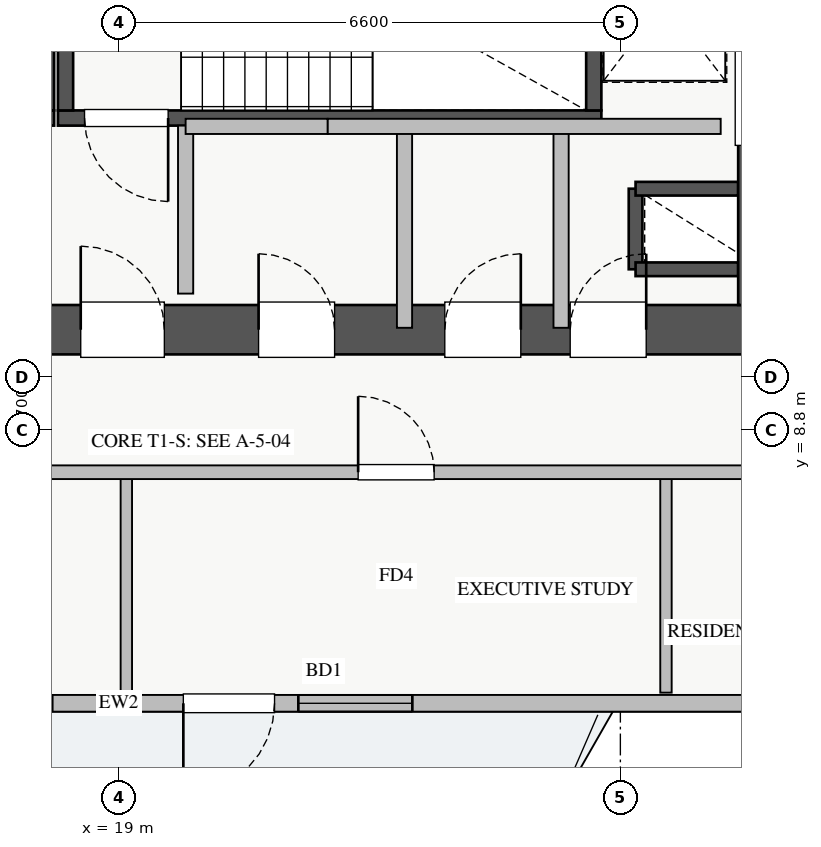
"""IFC4 building model, lengths in metres.
Left out: names, types, materials, properties, quantities, classifications, styles, units other than length and angle.
Written with IfcOpenShell. Run it as: python <this file> out.ifc"""

import sys

from ifc_helpers import new_model, si_unit, direction, frame, frame_2d, origin, place, context, subcontext, project, spatial, rectangle, extrude, source, transform, mapped, element, fill, save


model = new_model("IFC4")
c1 = context("Model", 3, precision=1e-05, world=origin(), true_north=direction((0.0, 1.0)))
c2 = subcontext(c1, "Body", "Model", "MODEL_VIEW")
j1 = project(units=[si_unit("LENGTHUNIT", "METRE"), si_unit("PLANEANGLEUNIT", "RADIAN")], contexts=[c1])
p1 = place(None, origin())
s1 = spatial("IfcSite", under=j1, at=p1, CompositionType="ELEMENT")
p2 = place(p1, origin())
s2 = spatial("IfcBuilding", under=s1, at=p2, CompositionType="ELEMENT")
p3 = place(p2, frame((0.0, 0.0, 119.75)))
s3 = spatial("IfcBuildingStorey", under=s2, at=p3, CompositionType="ELEMENT", Elevation=119.75)
p4 = place(p3, frame((25.8, 10.92, 0.0), z_axis=(0.0, 0.0, 1.0), x_axis=(0.0, 1.0, 0.0)))
e1 = element("IfcWall", 1, at=p4, inside=s3, PredefinedType="SHEAR", context=c2, shape_type="SweptSolid", body=[
    extrude(rectangle(XDim=1.06, YDim=0.18, at=frame_2d((0.53, 0.0))), origin(), (0.0, 0.0, 1.0), 3.07),
])
for number, where, z_axis, x_axis in (
    (2, (25.8, 11.98, 0.0), (0.0, 0.0, 1.0), (1.0, 0.0, 0.0)),
    (3, (25.8, 10.92, 0.0), (0.0, 0.0, 1.0), (1.0, 0.0, 0.0)),
):
    element("IfcWall", number, at=place(p3, frame(where, z_axis=z_axis, x_axis=x_axis)), inside=s3, PredefinedType="SHEAR", context=c2, shape_type="SweptSolid", body=[
        extrude(rectangle(XDim=1.35, YDim=0.18, at=frame_2d((0.675, 0.0))), origin(), (0.0, 0.0, 1.0), 3.07),
    ])
p5 = place(p3, frame((10.85, 12.91, 0.0), z_axis=(0.0, 0.0, 1.0), x_axis=(1.0, 0.0, 0.0)))
e4 = element("IfcWall", 4, at=p5, inside=s3, PredefinedType="SHEAR", context=c2, shape_type="SweptSolid", body=[
    extrude(rectangle(XDim=7.3, YDim=0.2, at=frame_2d((3.65, 0.0))), origin(), (0.0, 0.0, 1.0), 3.25),
])
p6 = place(p5, frame((0.35, 0.0, 0.0)))
e5 = element("IfcOpeningElement", 5, at=p6, cuts=e4, PredefinedType="OPENING", context=c2, shape_type="SweptSolid", body=[
    extrude(rectangle(XDim=1.1, YDim=2.05, at=frame_2d((0.55, 1.025))), frame((0.0, 0.11, 0.0), z_axis=(0.0, -1.0, 0.0), x_axis=(1.0, 0.0, 0.0)), (0.0, 0.0, 1.0), 0.22),
])
p7 = place(p3, frame((18.05, 13.01, 0.0), z_axis=(0.0, 0.0, 1.0), x_axis=(0.0, 1.0, 0.0)))
e6 = element("IfcWall", 6, at=p7, inside=s3, PredefinedType="SHEAR", context=c2, shape_type="SweptSolid", body=[
    extrude(rectangle(XDim=2.94, YDim=0.2, at=frame_2d((1.47, 0.0))), origin(), (0.0, 0.0, 1.0), 3.25),
])
p8 = place(p3, frame((18.2, 12.91, 0.0), z_axis=(0.0, 0.0, 1.0), x_axis=(1.0, 0.0, 0.0)))
e7 = element("IfcWall", 7, at=p8, inside=s3, PredefinedType="SHEAR", context=c2, shape_type="SweptSolid", body=[
    extrude(rectangle(XDim=7.15, YDim=0.2, at=frame_2d((3.575, 0.0))), origin(), (0.0, 0.0, 1.0), 3.25),
])
p9 = place(p8, frame((0.35, 0.0, 0.0)))
e8 = element("IfcOpeningElement", 8, at=p9, cuts=e7, PredefinedType="OPENING", context=c2, shape_type="SweptSolid", body=[
    extrude(rectangle(XDim=1.1, YDim=2.05, at=frame_2d((0.55, 1.025))), frame((0.0, 0.11, 0.0), z_axis=(0.0, -1.0, 0.0), x_axis=(1.0, 0.0, 0.0)), (0.0, 0.0, 1.0), 0.22),
])
for number, where, z_axis, x_axis in (
    (9, (18.3, 13.01, 0.0), (0.0, 0.0, 1.0), (0.0, 1.0, 0.0)),
    (10, (25.25, 13.01, 0.0), (0.0, 0.0, 1.0), (0.0, 1.0, 0.0)),
):
    element("IfcWall", number, at=place(p3, frame(where, z_axis=z_axis, x_axis=x_axis)), inside=s3, PredefinedType="SHEAR", context=c2, shape_type="SweptSolid", body=[
        extrude(rectangle(XDim=2.94, YDim=0.2, at=frame_2d((1.47, 0.0))), origin(), (0.0, 0.0, 1.0), 3.25),
    ])
p10 = place(p3, frame((10.2, 10.125, 0.0), z_axis=(0.0, 0.0, 1.0), x_axis=(1.0, 0.0, 0.0)))
e11 = element("IfcWall", 11, at=p10, inside=s3, PredefinedType="SHEAR", context=c2, shape_type="SweptSolid", body=[
    extrude(rectangle(XDim=17.6, YDim=0.65, at=frame_2d((8.8, 0.0))), origin(), (0.0, 0.0, 1.0), 3.25),
])
p11 = place(p10, frame((1.15, 0.0, 0.0)))
e12 = element("IfcOpeningElement", 12, at=p11, cuts=e11, PredefinedType="OPENING", context=c2, shape_type="SweptSolid", body=[
    extrude(rectangle(XDim=1.1, YDim=2.05, at=frame_2d((0.55, 1.025))), frame((0.0, 0.335, 0.0), z_axis=(0.0, -1.0, 0.0), x_axis=(1.0, 0.0, 0.0)), (0.0, 0.0, 1.0), 0.67),
])
p12 = place(p10, frame((8.3, 0.0, 0.0)))
e13 = element("IfcOpeningElement", 13, at=p12, cuts=e11, PredefinedType="OPENING", context=c2, shape_type="SweptSolid", body=[
    extrude(rectangle(XDim=1.1, YDim=2.05, at=frame_2d((0.55, 1.025))), frame((0.0, 0.335, 0.0), z_axis=(0.0, -1.0, 0.0), x_axis=(1.0, 0.0, 0.0)), (0.0, 0.0, 1.0), 0.67),
])
p13 = place(p10, frame((4.9, 0.0, 0.0)))
e14 = element("IfcOpeningElement", 14, at=p13, cuts=e11, PredefinedType="OPENING", context=c2, shape_type="SweptSolid", body=[
    extrude(rectangle(XDim=1.1, YDim=2.05, at=frame_2d((0.55, 1.025))), frame((0.0, 0.335, 0.0), z_axis=(0.0, -1.0, 0.0), x_axis=(1.0, 0.0, 0.0)), (0.0, 0.0, 1.0), 0.67),
])
p14 = place(p10, frame((14.74, 0.0, 0.0)))
e15 = element("IfcOpeningElement", 15, at=p14, cuts=e11, PredefinedType="OPENING", context=c2, shape_type="SweptSolid", body=[
    extrude(rectangle(XDim=1.0, YDim=2.05, at=frame_2d((0.5, 1.025))), frame((0.0, 0.335, 0.0), z_axis=(0.0, -1.0, 0.0), x_axis=(1.0, 0.0, 0.0)), (0.0, 0.0, 1.0), 0.67),
])
p15 = place(p10, frame((10.64, 0.0, 0.0)))
e16 = element("IfcOpeningElement", 16, at=p15, cuts=e11, PredefinedType="OPENING", context=c2, shape_type="SweptSolid", body=[
    extrude(rectangle(XDim=1.0, YDim=2.05, at=frame_2d((0.5, 1.025))), frame((0.0, 0.335, 0.0), z_axis=(0.0, -1.0, 0.0), x_axis=(1.0, 0.0, 0.0)), (0.0, 0.0, 1.0), 0.67),
])
p16 = place(p10, frame((13.09, 0.0, 0.0)))
e17 = element("IfcOpeningElement", 17, at=p16, cuts=e11, PredefinedType="OPENING", context=c2, shape_type="SweptSolid", body=[
    extrude(rectangle(XDim=1.0, YDim=2.05, at=frame_2d((0.5, 1.025))), frame((0.0, 0.335, 0.0), z_axis=(0.0, -1.0, 0.0), x_axis=(1.0, 0.0, 0.0)), (0.0, 0.0, 1.0), 0.67),
])
p17 = place(p3, frame((27.475, 10.45, 0.0), z_axis=(0.0, 0.0, 1.0), x_axis=(0.0, 1.0, 0.0)))
e18 = element("IfcWall", 18, at=p17, inside=s3, PredefinedType="SHEAR", context=c2, shape_type="SweptSolid", body=[
    extrude(rectangle(XDim=5.9, YDim=0.65, at=frame_2d((2.95, 0.0))), origin(), (0.0, 0.0, 1.0), 3.25),
])
p18 = place(p17, frame((2.1, 0.0, 0.0)))
e19 = element("IfcOpeningElement", 19, at=p18, cuts=e18, PredefinedType="OPENING", context=c2, shape_type="SweptSolid", body=[
    extrude(rectangle(XDim=1.3, YDim=2.05, at=frame_2d((0.65, 1.025))), frame((0.0, 0.335, 0.0), z_axis=(0.0, -1.0, 0.0), x_axis=(1.0, 0.0, 0.0)), (0.0, 0.0, 1.0), 0.67),
])
p19 = place(p3, frame((6.55, 5.21, 0.0), z_axis=(0.0, 0.0, 1.0), x_axis=(1.0, 0.0, 0.0)))
e20 = element("IfcWall", 20, at=p19, inside=s3, PredefinedType="STANDARD", context=c2, shape_type="SweptSolid", body=[
    extrude(rectangle(XDim=24.9, YDim=0.22, at=frame_2d((12.45, 0.0))), origin(), (0.0, 0.0, 1.0), 2.61),
])
p20 = place(p19, frame((13.3, 0.0, 0.0)))
e21 = element("IfcOpeningElement", 21, at=p20, cuts=e20, PredefinedType="OPENING", context=c2, shape_type="SweptSolid", body=[
    extrude(rectangle(XDim=1.2, YDim=2.1, at=frame_2d((0.6, 1.05))), frame((0.0, 0.12, 0.0), z_axis=(0.0, -1.0, 0.0), x_axis=(1.0, 0.0, 0.0)), (0.0, 0.0, 1.0), 0.24),
])
p21 = place(p19, frame((0.258, 0.0, 0.9)))
e22 = element("IfcOpeningElement", 22, at=p21, cuts=e20, PredefinedType="OPENING", context=c2, shape_type="SweptSolid", body=[
    extrude(rectangle(XDim=1.8, YDim=1.5, at=frame_2d((0.9, 0.75))), frame((0.0, 0.12, 0.0), z_axis=(0.0, -1.0, 0.0), x_axis=(1.0, 0.0, 0.0)), (0.0, 0.0, 1.0), 0.24),
])
p22 = place(p19, frame((9.775, 0.0, 0.9)))
e23 = element("IfcOpeningElement", 23, at=p22, cuts=e20, PredefinedType="OPENING", context=c2, shape_type="SweptSolid", body=[
    extrude(rectangle(XDim=1.8, YDim=1.5, at=frame_2d((0.9, 0.75))), frame((0.0, 0.12, 0.0), z_axis=(0.0, -1.0, 0.0), x_axis=(1.0, 0.0, 0.0)), (0.0, 0.0, 1.0), 0.24),
])
p23 = place(p19, frame((14.813, 0.0, 0.9)))
e24 = element("IfcOpeningElement", 24, at=p23, cuts=e20, PredefinedType="OPENING", context=c2, shape_type="SweptSolid", body=[
    extrude(rectangle(XDim=1.5, YDim=1.45, at=frame_2d((0.75, 0.725))), frame((0.0, 0.12, 0.0), z_axis=(0.0, -1.0, 0.0), x_axis=(1.0, 0.0, 0.0)), (0.0, 0.0, 1.0), 0.24),
])
p24 = place(p19, frame((20.738, 0.0, 0.9)))
e25 = element("IfcOpeningElement", 25, at=p24, cuts=e20, PredefinedType="OPENING", context=c2, shape_type="SweptSolid", body=[
    extrude(rectangle(XDim=2.1, YDim=1.48, at=frame_2d((1.05, 0.74))), frame((0.0, 0.12, 0.0), z_axis=(0.0, -1.0, 0.0), x_axis=(1.0, 0.0, 0.0)), (0.0, 0.0, 1.0), 0.24),
])
p25 = place(p19, frame((4.187, 0.0, 0.9)))
e26 = element("IfcOpeningElement", 26, at=p25, cuts=e20, PredefinedType="OPENING", context=c2, shape_type="SweptSolid", body=[
    extrude(rectangle(XDim=2.4, YDim=1.5, at=frame_2d((1.2, 0.75))), frame((0.0, 0.12, 0.0), z_axis=(0.0, -1.0, 0.0), x_axis=(1.0, 0.0, 0.0)), (0.0, 0.0, 1.0), 0.24),
])
p26 = place(p3, frame((19.88, 10.6, 0.0), z_axis=(0.0, 0.0, 1.0), x_axis=(0.0, 1.0, 0.0)))
e27 = element("IfcWall", 27, at=p26, inside=s3, PredefinedType="PARTITIONING", context=c2, shape_type="SweptSolid", body=[
    extrude(rectangle(XDim=2.21, YDim=0.2, at=frame_2d((1.105, 0.0))), origin(), (0.0, 0.0, 1.0), 3.07),
])
p27 = place(p3, frame((24.82, 10.15, 0.0), z_axis=(0.0, 0.0, 1.0), x_axis=(0.0, 1.0, 0.0)))
e28 = element("IfcWall", 28, at=p27, inside=s3, PredefinedType="PARTITIONING", context=c2, shape_type="SweptSolid", body=[
    extrude(rectangle(XDim=2.65, YDim=0.2, at=frame_2d((1.325, 0.0))), origin(), (0.0, 0.0, 1.0), 3.07),
])
p28 = place(p3, frame((19.88, 12.8, 0.0), z_axis=(0.0, 0.0, 1.0), x_axis=(1.0, 0.0, 0.0)))
e29 = element("IfcWall", 29, at=p28, inside=s3, PredefinedType="PARTITIONING", context=c2, shape_type="SweptSolid", body=[
    extrude(rectangle(XDim=1.87, YDim=0.2, at=frame_2d((0.935, 0.0))), origin(), (0.0, 0.0, 1.0), 3.07),
])
p29 = place(p3, frame((22.76, 10.15, 0.0), z_axis=(0.0, 0.0, 1.0), x_axis=(0.0, 1.0, 0.0)))
e30 = element("IfcWall", 30, at=p29, inside=s3, PredefinedType="PARTITIONING", context=c2, shape_type="SweptSolid", body=[
    extrude(rectangle(XDim=2.65, YDim=0.2, at=frame_2d((1.325, 0.0))), origin(), (0.0, 0.0, 1.0), 3.07),
])
p30 = place(p3, frame((21.75, 12.8, 0.0), z_axis=(0.0, 0.0, 1.0), x_axis=(1.0, 0.0, 0.0)))
e31 = element("IfcWall", 31, at=p30, inside=s3, PredefinedType="PARTITIONING", context=c2, shape_type="SweptSolid", body=[
    extrude(rectangle(XDim=5.17, YDim=0.2, at=frame_2d((2.585, 0.0))), origin(), (0.0, 0.0, 1.0), 3.07),
])
p31 = place(p3, frame((19.1, 5.35, 0.0), z_axis=(0.0, 0.0, 1.0), x_axis=(0.0, 1.0, 0.0)))
e32 = element("IfcWall", 32, at=p31, inside=s3, PredefinedType="PARTITIONING", context=c2, shape_type="SweptSolid", body=[
    extrude(rectangle(XDim=2.9, YDim=0.15, at=frame_2d((1.45, 0.0))), origin(), (0.0, 0.0, 1.0), 2.821),
])
p32 = place(p3, frame((26.2, 5.35, 0.0), z_axis=(0.0, 0.0, 1.0), x_axis=(0.0, 1.0, 0.0)))
e33 = element("IfcWall", 33, at=p32, inside=s3, PredefinedType="PARTITIONING", context=c2, shape_type="SweptSolid", body=[
    extrude(rectangle(XDim=2.9, YDim=0.15, at=frame_2d((1.45, 0.0))), origin(), (0.0, 0.0, 1.0), 3.07),
])
p33 = place(p3, frame((8.85, 8.25, 0.0), z_axis=(0.0, 0.0, 1.0), x_axis=(1.0, 0.0, 0.0)))
e34 = element("IfcWall", 34, at=p33, inside=s3, PredefinedType="PARTITIONING", context=c2, shape_type="SweptSolid", body=[
    extrude(rectangle(XDim=23.57, YDim=0.18, at=frame_2d((11.785, 0.0))), origin(), (0.0, 0.0, 1.0), 3.07),
])
p34 = place(p33, frame((2.75, 0.0, 0.0)))
e35 = element("IfcOpeningElement", 35, at=p34, cuts=e34, PredefinedType="OPENING", context=c2, shape_type="SweptSolid", body=[
    extrude(rectangle(XDim=1.0, YDim=2.05, at=frame_2d((0.5, 1.025))), frame((0.0, 0.1, 0.0), z_axis=(0.0, -1.0, 0.0), x_axis=(1.0, 0.0, 0.0)), (0.0, 0.0, 1.0), 0.2),
])
p35 = place(p33, frame((7.875, 0.0, 0.0)))
e36 = element("IfcOpeningElement", 36, at=p35, cuts=e34, PredefinedType="OPENING", context=c2, shape_type="SweptSolid", body=[
    extrude(rectangle(XDim=1.0, YDim=2.05, at=frame_2d((0.5, 1.025))), frame((0.0, 0.1, 0.0), z_axis=(0.0, -1.0, 0.0), x_axis=(1.0, 0.0, 0.0)), (0.0, 0.0, 1.0), 0.2),
])
p36 = place(p33, frame((13.3, 0.0, 0.0)))
e37 = element("IfcOpeningElement", 37, at=p36, cuts=e34, PredefinedType="OPENING", context=c2, shape_type="SweptSolid", body=[
    extrude(rectangle(XDim=1.0, YDim=2.05, at=frame_2d((0.5, 1.025))), frame((0.0, 0.1, 0.0), z_axis=(0.0, -1.0, 0.0), x_axis=(1.0, 0.0, 0.0)), (0.0, 0.0, 1.0), 0.2),
])
p37 = place(p33, frame((19.74, 0.0, 0.0)))
e38 = element("IfcOpeningElement", 38, at=p37, cuts=e34, PredefinedType="OPENING", context=c2, shape_type="SweptSolid", body=[
    extrude(rectangle(XDim=1.0, YDim=2.05, at=frame_2d((0.5, 1.025))), frame((0.0, 0.1, 0.0), z_axis=(0.0, -1.0, 0.0), x_axis=(1.0, 0.0, 0.0)), (0.0, 0.0, 1.0), 0.2),
])
m1 = source(origin(), c2, "Body", "SweptSolid", [
    extrude(rectangle(XDim=1.2, YDim=2.1, at=frame_2d((0.6, 1.05))), frame((0.0, 0.025, 0.0), z_axis=(0.0, -1.0, 0.0), x_axis=(1.0, 0.0, 0.0)), (0.0, 0.0, 1.0), 0.05),
])
p38 = place(p20, frame((1.2, 0.0, 0.0), z_axis=(0.0, 0.0, 1.0), x_axis=(-1.0, 0.0, 0.0)))
e39 = element("IfcDoor", 39, at=p38, inside=s3, OperationType="SINGLE_SWING_LEFT", PredefinedType="DOOR", context=c2, shape_type="MappedRepresentation", body=[
    mapped(m1, transform((0.0, 0.0, 0.0), x_axis=(1.0, 0.0, 0.0), y_axis=(0.0, 1.0, 0.0), z_axis=(0.0, 0.0, 1.0), scale=1.0)),
])
fill(e21, e39)
m2 = source(origin(), c2, "Body", "SweptSolid", [
    extrude(rectangle(XDim=1.8, YDim=1.5, at=frame_2d((0.9, 0.75))), frame((0.0, 0.03, 0.0), z_axis=(0.0, -1.0, 0.0), x_axis=(1.0, 0.0, 0.0)), (0.0, 0.0, 1.0), 0.06),
])
p39 = place(p22, origin())
e40 = element("IfcWindow", 40, at=p39, inside=s3, PartitioningType="DOUBLE_PANEL_VERTICAL", PredefinedType="WINDOW", context=c2, shape_type="MappedRepresentation", body=[
    mapped(m2, transform((0.0, 0.0, 0.0), x_axis=(1.0, 0.0, 0.0), y_axis=(0.0, 1.0, 0.0), z_axis=(0.0, 0.0, 1.0), scale=1.0)),
])
fill(e23, e40)
m3 = source(origin(), c2, "Body", "SweptSolid", [
    extrude(rectangle(XDim=1.5, YDim=1.45, at=frame_2d((0.75, 0.725))), frame((0.0, 0.03, 0.0), z_axis=(0.0, -1.0, 0.0), x_axis=(1.0, 0.0, 0.0)), (0.0, 0.0, 1.0), 0.06),
])
p40 = place(p23, origin())
e41 = element("IfcWindow", 41, at=p40, inside=s3, PartitioningType="DOUBLE_PANEL_VERTICAL", PredefinedType="WINDOW", context=c2, shape_type="MappedRepresentation", body=[
    mapped(m3, transform((0.0, 0.0, 0.0), x_axis=(1.0, 0.0, 0.0), y_axis=(0.0, 1.0, 0.0), z_axis=(0.0, 0.0, 1.0), scale=1.0)),
])
fill(e24, e41)
m4 = source(origin(), c2, "Body", "SweptSolid", [
    extrude(rectangle(XDim=1.1, YDim=2.05, at=frame_2d((0.55, 1.025))), frame((0.0, 0.025, 0.0), z_axis=(0.0, -1.0, 0.0), x_axis=(1.0, 0.0, 0.0)), (0.0, 0.0, 1.0), 0.05),
])
p41 = place(p12, origin())
e42 = element("IfcDoor", 42, at=p41, inside=s3, OperationType="SINGLE_SWING_LEFT", PredefinedType="DOOR", context=c2, shape_type="MappedRepresentation", body=[
    mapped(m4, transform((0.0, 0.0, 0.0), x_axis=(1.0, 0.0, 0.0), y_axis=(0.0, 1.0, 0.0), z_axis=(0.0, 0.0, 1.0), scale=1.0)),
])
fill(e13, e42)
p42 = place(p9, frame((1.1, 0.0, 0.0), z_axis=(0.0, 0.0, 1.0), x_axis=(-1.0, 0.0, 0.0)))
e43 = element("IfcDoor", 43, at=p42, inside=s3, OperationType="SINGLE_SWING_RIGHT", PredefinedType="DOOR", context=c2, shape_type="MappedRepresentation", body=[
    mapped(m4, transform((0.0, 0.0, 0.0), x_axis=(1.0, 0.0, 0.0), y_axis=(0.0, 1.0, 0.0), z_axis=(0.0, 0.0, 1.0), scale=1.0)),
])
fill(e8, e43)
m5 = source(origin(), c2, "Body", "SweptSolid", [
    extrude(rectangle(XDim=1.0, YDim=2.05, at=frame_2d((0.5, 1.025))), frame((0.0, 0.025, 0.0), z_axis=(0.0, -1.0, 0.0), x_axis=(1.0, 0.0, 0.0)), (0.0, 0.0, 1.0), 0.05),
])
p43 = place(p14, origin())
e44 = element("IfcDoor", 44, at=p43, inside=s3, OperationType="SINGLE_SWING_RIGHT", PredefinedType="DOOR", context=c2, shape_type="MappedRepresentation", body=[
    mapped(m5, transform((0.0, 0.0, 0.0), x_axis=(1.0, 0.0, 0.0), y_axis=(0.0, 1.0, 0.0), z_axis=(0.0, 0.0, 1.0), scale=1.0)),
])
fill(e15, e44)
p44 = place(p15, origin())
e45 = element("IfcDoor", 45, at=p44, inside=s3, OperationType="SINGLE_SWING_LEFT", PredefinedType="DOOR", context=c2, shape_type="MappedRepresentation", body=[
    mapped(m5, transform((0.0, 0.0, 0.0), x_axis=(1.0, 0.0, 0.0), y_axis=(0.0, 1.0, 0.0), z_axis=(0.0, 0.0, 1.0), scale=1.0)),
])
fill(e16, e45)
p45 = place(p16, origin())
e46 = element("IfcDoor", 46, at=p45, inside=s3, OperationType="SINGLE_SWING_RIGHT", PredefinedType="DOOR", context=c2, shape_type="MappedRepresentation", body=[
    mapped(m5, transform((0.0, 0.0, 0.0), x_axis=(1.0, 0.0, 0.0), y_axis=(0.0, 1.0, 0.0), z_axis=(0.0, 0.0, 1.0), scale=1.0)),
])
fill(e17, e46)
p46 = place(p36, origin())
e47 = element("IfcDoor", 47, at=p46, inside=s3, OperationType="SINGLE_SWING_LEFT", PredefinedType="DOOR", context=c2, shape_type="MappedRepresentation", body=[
    mapped(m5, transform((0.0, 0.0, 0.0), x_axis=(1.0, 0.0, 0.0), y_axis=(0.0, 1.0, 0.0), z_axis=(0.0, 0.0, 1.0), scale=1.0)),
])
fill(e37, e47)
save(model, sys.argv[1])
